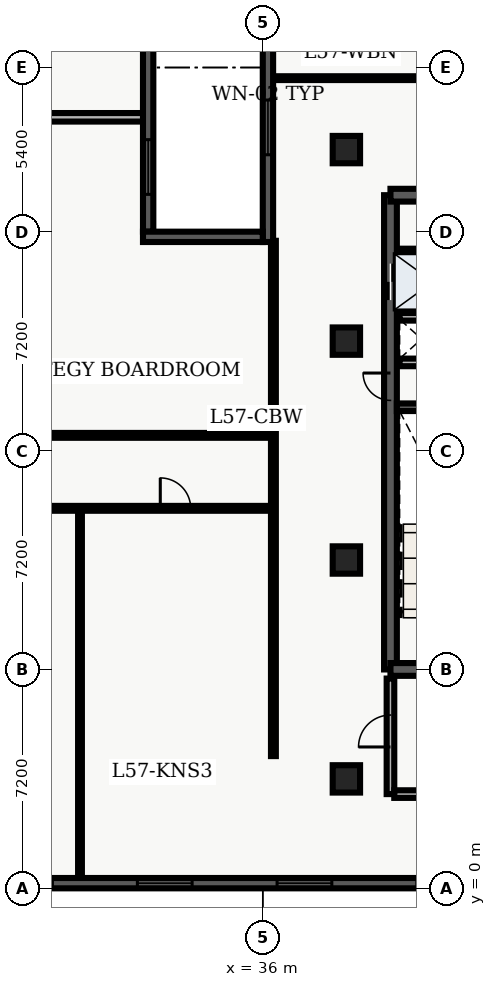
"""IFC4 building model, lengths in metres.
Left out: names, types, materials, properties, quantities, classifications, styles, units other than length and angle.
Written with IfcOpenShell. Run it as: python <this file> out.ifc"""

import sys

from ifc_helpers import new_model, entity, si_unit, converted_unit, direction, frame, origin_with_axes, origin_2d_with_axis, place, context, subcontext, project, spatial, polyline, rectangle, outline, extrude, element, fill, save


model = new_model("IFC4")
c1 = context("Model", 3, precision=1e-05, world=origin_with_axes(), true_north=direction((0.0, 1.0)))
c2 = subcontext(c1, "Body", "Model", "MODEL_VIEW")
j1 = project(units=[si_unit("LENGTHUNIT", "METRE"), converted_unit("PLANEANGLEUNIT", "DEGREE", entity("IfcPlaneAngleMeasure", 0.017), si_unit("PLANEANGLEUNIT", "RADIAN"), dimensions=[0, 0, 0, 0, 0, 0, 0])], contexts=[c1])
p1 = place(None, origin_with_axes())
s1 = spatial("IfcSite", under=j1, at=p1, CompositionType="ELEMENT")
p2 = place(p1, origin_with_axes())
s2 = spatial("IfcBuilding", under=s1, at=p2, CompositionType="ELEMENT")
p3 = place(p2, frame((0.0, 0.0, 232.5), z_axis=(0.0, 0.0, 1.0), x_axis=(1.0, 0.0, 0.0)))
s3 = spatial("IfcBuildingStorey", under=s2, at=p3, CompositionType="ELEMENT", Elevation=232.5)
p4 = place(p3, frame((40.2, 7.2, 0.0), z_axis=(0.0, 0.0, 1.0), x_axis=(0.0, 1.0, 0.0)))
e1 = element("IfcWall", 1, at=p4, inside=s3, PredefinedType="SHEAR", context=c2, shape_type="SweptSolid", body=[
    extrude(outline(polyline([(0.0, -0.21), (15.6, -0.21), (15.6, 0.21), (0.0, 0.21), (0.0, -0.21)])), origin_with_axes(), (0.0, 0.0, 1.0), 3.66),
])
p5 = place(p4, frame((12.75, 0.0, 0.0), z_axis=(0.0, 0.0, 1.0), x_axis=(1.0, 0.0, 0.0)))
e2 = element("IfcOpeningElement", 2, at=p5, cuts=e1, PredefinedType="OPENING", context=c2, shape_type="SweptSolid", body=[
    extrude(rectangle(XDim=1.2, YDim=0.44, at=origin_2d_with_axis()), origin_with_axes(), (0.0, 0.0, 1.0), 2.15),
])
p6 = place(p4, frame((9.3, 0.0, 0.0), z_axis=(0.0, 0.0, 1.0), x_axis=(1.0, 0.0, 0.0)))
e3 = element("IfcOpeningElement", 3, at=p6, cuts=e1, PredefinedType="OPENING", context=c2, shape_type="SweptSolid", body=[
    extrude(rectangle(XDim=0.9, YDim=0.44, at=origin_2d_with_axis()), origin_with_axes(), (0.0, 0.0, 1.0), 2.15),
])
p7 = place(p3, frame((40.2, 7.2, 0.0), z_axis=(0.0, 0.0, 1.0), x_axis=(1.0, 0.0, 0.0)))
e4 = element("IfcWall", 4, at=p7, inside=s3, PredefinedType="SHEAR", context=c2, shape_type="SweptSolid", body=[
    extrude(outline(polyline([(0.0, -0.21), (7.85, -0.21), (7.85, 0.21), (0.0, 0.21), (0.0, -0.21)])), origin_with_axes(), (0.0, 0.0, 1.0), 3.66),
])
p8 = place(p7, frame((2.175, 0.0, 0.0), z_axis=(0.0, 0.0, 1.0), x_axis=(1.0, 0.0, 0.0)))
e5 = element("IfcOpeningElement", 5, at=p8, cuts=e4, PredefinedType="OPENING", context=c2, shape_type="SweptSolid", body=[
    extrude(rectangle(XDim=1.05, YDim=0.44, at=origin_2d_with_axis()), origin_with_axes(), (0.0, 0.0, 1.0), 2.15),
])
p9 = place(p3, frame((40.2, 22.8, 0.0), z_axis=(0.0, 0.0, 1.0), x_axis=(1.0, 0.0, 0.0)))
e6 = element("IfcWall", 6, at=p9, inside=s3, PredefinedType="SHEAR", context=c2, shape_type="SweptSolid", body=[
    extrude(outline(polyline([(0.0, -0.21), (7.85, -0.21), (7.85, 0.21), (0.0, 0.21), (0.0, -0.21)])), origin_with_axes(), (0.0, 0.0, 1.0), 3.66),
])
p10 = place(p9, frame((5.775, 0.0, 0.0), z_axis=(0.0, 0.0, 1.0), x_axis=(1.0, 0.0, 0.0)))
e7 = element("IfcOpeningElement", 7, at=p10, cuts=e6, PredefinedType="OPENING", context=c2, shape_type="SweptSolid", body=[
    extrude(rectangle(XDim=1.05, YDim=0.44, at=origin_2d_with_axis()), origin_with_axes(), (0.0, 0.0, 1.0), 2.15),
])
p11 = place(p9, frame((2.15, 0.0, 0.0), z_axis=(0.0, 0.0, 1.0), x_axis=(1.0, 0.0, 0.0)))
e8 = element("IfcOpeningElement", 8, at=p11, cuts=e6, PredefinedType="OPENING", context=c2, shape_type="SweptSolid", body=[
    extrude(rectangle(XDim=0.9, YDim=0.44, at=origin_2d_with_axis()), origin_with_axes(), (0.0, 0.0, 1.0), 2.15),
])
p12 = place(p3, frame((40.41, 15.825, 0.0), z_axis=(0.0, 0.0, 1.0), x_axis=(1.0, 0.0, 0.0)))
e9 = element("IfcWall", 9, at=p12, inside=s3, PredefinedType="SHEAR", context=c2, shape_type="SweptSolid", body=[
    extrude(outline(polyline([(0.0, -0.125), (3.59, -0.125), (3.59, 0.125), (0.0, 0.125), (0.0, -0.125)])), origin_with_axes(), (0.0, 0.0, 1.0), 3.66),
])
p13 = place(p3, frame((40.5, 17.3, 0.0), z_axis=(0.0, 0.0, 1.0), x_axis=(1.0, 0.0, 0.0)))
e10 = element("IfcWall", 10, at=p13, inside=s3, PredefinedType="SOLIDWALL", context=c2, shape_type="SweptSolid", body=[
    extrude(outline(polyline([(0.0, -0.125), (3.5, -0.125), (3.5, 0.125), (0.0, 0.125), (0.0, -0.125)])), origin_with_axes(), (0.0, 0.0, 1.0), 2.7),
])
p14 = place(p13, frame((2.4, 0.0, 0.0), z_axis=(0.0, 0.0, 1.0), x_axis=(1.0, 0.0, 0.0)))
e11 = element("IfcOpeningElement", 11, at=p14, cuts=e10, PredefinedType="OPENING", context=c2, shape_type="SweptSolid", body=[
    extrude(rectangle(XDim=0.9, YDim=0.27, at=origin_2d_with_axis()), origin_with_axes(), (0.0, 0.0, 1.0), 2.15),
])
p15 = place(p3, frame((40.5, 18.8, 0.0), z_axis=(0.0, 0.0, 1.0), x_axis=(1.0, 0.0, 0.0)))
e12 = element("IfcWall", 12, at=p15, inside=s3, PredefinedType="SOLIDWALL", context=c2, shape_type="SweptSolid", body=[
    extrude(outline(polyline([(0.0, -0.125), (3.5, -0.125), (3.5, 0.125), (0.0, 0.125), (0.0, -0.125)])), origin_with_axes(), (0.0, 0.0, 1.0), 2.7),
])
p16 = place(p3, frame((40.2, 3.1, 0.0), z_axis=(0.0, 0.0, 1.0), x_axis=(0.0, 1.0, 0.0)))
e13 = element("IfcWall", 13, at=p16, inside=s3, PredefinedType="SOLIDWALL", context=c2, shape_type="SweptSolid", body=[
    extrude(outline(polyline([(0.0, -0.125), (3.8, -0.125), (3.8, 0.125), (0.0, 0.125), (0.0, -0.125)])), origin_with_axes(), (0.0, 0.0, 1.0), 2.7),
])
p17 = place(p16, frame((2.075, 0.0, 0.0), z_axis=(0.0, 0.0, 1.0), x_axis=(1.0, 0.0, 0.0)))
e14 = element("IfcOpeningElement", 14, at=p17, cuts=e13, PredefinedType="OPENING", context=c2, shape_type="SweptSolid", body=[
    extrude(rectangle(XDim=1.05, YDim=0.27, at=origin_2d_with_axis()), origin_with_axes(), (0.0, 0.0, 1.0), 2.15),
])
p18 = place(p3, frame((40.325, 3.1, 0.0), z_axis=(0.0, 0.0, 1.0), x_axis=(1.0, 0.0, 0.0)))
e15 = element("IfcWall", 15, at=p18, inside=s3, PredefinedType="SOLIDWALL", context=c2, shape_type="SweptSolid", body=[
    extrude(outline(polyline([(0.0, -0.125), (3.95, -0.125), (3.95, 0.125), (0.0, 0.125), (0.0, -0.125)])), origin_with_axes(), (0.0, 0.0, 1.0), 2.7),
])
for number, where, z_axis, x_axis in (
    (16, (38.75, 3.6, 0.0), (0.0, 0.0, 1.0), (1.0, 0.0, 0.0)),
    (17, (38.75, 10.8, 0.0), (0.0, 0.0, 1.0), (1.0, 0.0, 0.0)),
    (18, (38.75, 18.0, 0.0), (0.0, 0.0, 1.0), (1.0, 0.0, 0.0)),
    (19, (38.75, 24.3, 0.0), (0.0, 0.0, 1.0), (1.0, 0.0, 0.0)),
):
    element("IfcColumn", number, at=place(p3, frame(where, z_axis=z_axis, x_axis=x_axis)), inside=s3, PredefinedType="COLUMN", context=c2, shape_type="SweptSolid", body=[
        extrude(rectangle(XDim=0.9, YDim=0.9, at=origin_2d_with_axis()), origin_with_axes(), (0.0, 0.0, 1.0), 3.9),
    ])
p19 = place(p3, frame((40.5, 20.96, 0.0), z_axis=(0.0, 0.0, 1.0), x_axis=(1.0, 0.0, 0.0)))
e20 = element("IfcWall", 20, at=p19, inside=s3, PredefinedType="PARTITIONING", context=c2, shape_type="SweptSolid", body=[
    extrude(outline(polyline([(0.0, -0.08), (3.5, -0.08), (3.5, 0.08), (0.0, 0.08), (0.0, -0.08)])), origin_with_axes(), (0.0, 0.0, 1.0), 2.7),
])
p20 = place(p3, frame((20.45, 25.362, 0.0), z_axis=(0.0, 0.0, 1.0), x_axis=(1.0, 0.0, 0.0)))
e21 = element("IfcWall", 21, at=p20, inside=s3, PredefinedType="PARTITIONING", context=c2, shape_type="SweptSolid", body=[
    extrude(outline(polyline([(0.0, -0.14), (11.615, -0.14), (11.615, 0.14), (0.0, 0.14), (0.0, -0.14)])), origin_with_axes(), (0.0, 0.0, 1.0), 2.7),
])
p21 = place(p3, frame((20.3, 12.5, 0.0), z_axis=(0.0, 0.0, 1.0), x_axis=(1.0, 0.0, 0.0)))
e22 = element("IfcWall", 22, at=p21, inside=s3, PredefinedType="PARTITIONING", context=c2, shape_type="SweptSolid", body=[
    extrude(outline(polyline([(0.0, -0.08), (16.05, -0.08), (16.05, 0.08), (0.0, 0.08), (0.0, -0.08)])), origin_with_axes(), (0.0, 0.0, 1.0), 2.7),
])
p22 = place(p21, frame((2.383, 0.0, 0.0), z_axis=(0.0, 0.0, 1.0), x_axis=(1.0, 0.0, 0.0)))
e23 = element("IfcOpeningElement", 23, at=p22, cuts=e22, PredefinedType="OPENING", context=c2, shape_type="SweptSolid", body=[
    extrude(rectangle(XDim=1.2, YDim=0.18, at=origin_2d_with_axis()), origin_with_axes(), (0.0, 0.0, 1.0), 2.2),
])
p23 = place(p21, frame((7.137, 0.0, 0.0), z_axis=(0.0, 0.0, 1.0), x_axis=(1.0, 0.0, 0.0)))
e24 = element("IfcOpeningElement", 24, at=p23, cuts=e22, PredefinedType="OPENING", context=c2, shape_type="SweptSolid", body=[
    extrude(rectangle(XDim=1.0, YDim=0.18, at=origin_2d_with_axis()), origin_with_axes(), (0.0, 0.0, 1.0), 2.15),
])
p24 = place(p21, frame((12.829, 0.0, 0.0), z_axis=(0.0, 0.0, 1.0), x_axis=(1.0, 0.0, 0.0)))
e25 = element("IfcOpeningElement", 25, at=p24, cuts=e22, PredefinedType="OPENING", context=c2, shape_type="SweptSolid", body=[
    extrude(rectangle(XDim=1.0, YDim=0.18, at=origin_2d_with_axis()), origin_with_axes(), (0.0, 0.0, 1.0), 2.15),
])
p25 = place(p3, frame((20.3, 14.9, 0.0), z_axis=(0.0, 0.0, 1.0), x_axis=(1.0, 0.0, 0.0)))
e26 = element("IfcWall", 26, at=p25, inside=s3, PredefinedType="PARTITIONING", context=c2, shape_type="SweptSolid", body=[
    extrude(outline(polyline([(0.0, -0.08), (16.05, -0.08), (16.05, 0.08), (0.0, 0.08), (0.0, -0.08)])), origin_with_axes(), (0.0, 0.0, 1.0), 2.7),
])
p26 = place(p25, frame((8.075, 0.0, 0.0), z_axis=(0.0, 0.0, 1.0), x_axis=(1.0, 0.0, 0.0)))
e27 = element("IfcOpeningElement", 27, at=p26, cuts=e26, PredefinedType="OPENING", context=c2, shape_type="SweptSolid", body=[
    extrude(rectangle(XDim=1.2, YDim=0.18, at=origin_2d_with_axis()), origin_with_axes(), (0.0, 0.0, 1.0), 2.2),
])
p27 = place(p3, frame((36.35, 4.35, 0.0), z_axis=(0.0, 0.0, 1.0), x_axis=(0.0, 1.0, 0.0)))
e28 = element("IfcWall", 28, at=p27, inside=s3, PredefinedType="PARTITIONING", context=c2, shape_type="SweptSolid", body=[
    extrude(outline(polyline([(0.0, -0.08), (16.95, -0.08), (16.95, 0.08), (0.0, 0.08), (0.0, -0.08)])), origin_with_axes(), (0.0, 0.0, 1.0), 2.7),
])
p28 = place(p3, frame((29.988, 0.335, 0.0), z_axis=(0.0, 0.0, 1.0), x_axis=(0.0, 1.0, 0.0)))
e29 = element("IfcWall", 29, at=p28, inside=s3, PredefinedType="PARTITIONING", context=c2, shape_type="SweptSolid", body=[
    extrude(outline(polyline([(0.0, -0.062), (12.045, -0.062), (12.045, 0.062), (0.0, 0.062), (0.0, -0.062)])), origin_with_axes(), (0.0, 0.0, 1.0), 2.7),
])
p29 = place(p3, frame((36.335, 26.65, 0.0), z_axis=(0.0, 0.0, 1.0), x_axis=(1.0, 0.0, 0.0)))
e30 = element("IfcWall", 30, at=p29, inside=s3, PredefinedType="PARTITIONING", context=c2, shape_type="SweptSolid", body=[
    extrude(outline(polyline([(0.0, -0.062), (11.195, -0.062), (11.195, 0.062), (0.0, 0.062), (0.0, -0.062)])), origin_with_axes(), (0.0, 0.0, 1.0), 2.7),
])
p30 = place(p29, frame((6.665, 0.0, 0.0), z_axis=(0.0, 0.0, 1.0), x_axis=(1.0, 0.0, 0.0)))
e31 = element("IfcOpeningElement", 31, at=p30, cuts=e30, PredefinedType="OPENING", context=c2, shape_type="SweptSolid", body=[
    extrude(rectangle(XDim=1.0, YDim=0.145, at=origin_2d_with_axis()), origin_with_axes(), (0.0, 0.0, 1.0), 2.15),
])
p31 = place(p3, frame((36.17, 21.26, 0.0), z_axis=(0.0, 0.0, 1.0), x_axis=(0.0, 1.0, 0.0)))
e32 = element("IfcWall", 32, at=p31, inside=s3, PredefinedType="SOLIDWALL", context=c2, shape_type="SweptSolid", body=[
    extrude(outline(polyline([(0.0, -0.17), (7.54, -0.17), (7.54, 0.17), (0.0, 0.17), (0.0, -0.17)])), origin_with_axes(), (0.0, 0.0, 1.0), 3.66),
])
p32 = place(p31, frame((3.77, 0.0, 0.45), z_axis=(0.0, 0.0, 1.0), x_axis=(1.0, 0.0, 0.0)))
e33 = element("IfcOpeningElement", 33, at=p32, cuts=e32, PredefinedType="OPENING", context=c2, shape_type="SweptSolid", body=[
    extrude(rectangle(XDim=1.8, YDim=0.36, at=origin_2d_with_axis()), origin_with_axes(), (0.0, 0.0, 1.0), 2.1),
])
p33 = place(p3, frame((49.46, 0.17, 0.0), z_axis=(0.0, 0.0, 1.0), x_axis=(-1.0, 0.0, 0.0)))
e34 = element("IfcWall", 34, at=p33, inside=s3, PredefinedType="SOLIDWALL", context=c2, shape_type="SweptSolid", body=[
    extrude(outline(polyline([(0.0, -0.17), (42.56, -0.17), (42.56, 0.17), (0.0, 0.17), (0.0, -0.17)])), origin_with_axes(), (0.0, 0.0, 1.0), 3.66),
])
p34 = place(p33, frame((2.898, 0.0, 0.45), z_axis=(0.0, 0.0, 1.0), x_axis=(1.0, 0.0, 0.0)))
e35 = element("IfcOpeningElement", 35, at=p34, cuts=e34, PredefinedType="OPENING", context=c2, shape_type="SweptSolid", body=[
    extrude(rectangle(XDim=1.8, YDim=0.36, at=origin_2d_with_axis()), origin_with_axes(), (0.0, 0.0, 1.0), 2.1),
])
p35 = place(p33, frame((7.493, 0.0, 0.45), z_axis=(0.0, 0.0, 1.0), x_axis=(1.0, 0.0, 0.0)))
e36 = element("IfcOpeningElement", 36, at=p35, cuts=e34, PredefinedType="OPENING", context=c2, shape_type="SweptSolid", body=[
    extrude(rectangle(XDim=1.8, YDim=0.36, at=origin_2d_with_axis()), origin_with_axes(), (0.0, 0.0, 1.0), 2.1),
])
p36 = place(p33, frame((12.089, 0.0, 0.45), z_axis=(0.0, 0.0, 1.0), x_axis=(1.0, 0.0, 0.0)))
e37 = element("IfcOpeningElement", 37, at=p36, cuts=e34, PredefinedType="OPENING", context=c2, shape_type="SweptSolid", body=[
    extrude(rectangle(XDim=1.8, YDim=0.36, at=origin_2d_with_axis()), origin_with_axes(), (0.0, 0.0, 1.0), 2.1),
])
p37 = place(p33, frame((16.684, 0.0, 0.45), z_axis=(0.0, 0.0, 1.0), x_axis=(1.0, 0.0, 0.0)))
e38 = element("IfcOpeningElement", 38, at=p37, cuts=e34, PredefinedType="OPENING", context=c2, shape_type="SweptSolid", body=[
    extrude(rectangle(XDim=1.8, YDim=0.36, at=origin_2d_with_axis()), origin_with_axes(), (0.0, 0.0, 1.0), 2.1),
])
p38 = place(p33, frame((21.28, 0.0, 0.45), z_axis=(0.0, 0.0, 1.0), x_axis=(1.0, 0.0, 0.0)))
e39 = element("IfcOpeningElement", 39, at=p38, cuts=e34, PredefinedType="OPENING", context=c2, shape_type="SweptSolid", body=[
    extrude(rectangle(XDim=1.8, YDim=0.36, at=origin_2d_with_axis()), origin_with_axes(), (0.0, 0.0, 1.0), 2.1),
])
p39 = place(p33, frame((26.326, 0.0, 0.45), z_axis=(0.0, 0.0, 1.0), x_axis=(1.0, 0.0, 0.0)))
e40 = element("IfcOpeningElement", 40, at=p39, cuts=e34, PredefinedType="OPENING", context=c2, shape_type="SweptSolid", body=[
    extrude(rectangle(XDim=1.8, YDim=0.36, at=origin_2d_with_axis()), origin_with_axes(), (0.0, 0.0, 1.0), 2.1),
])
p40 = place(p33, frame((30.471, 0.0, 0.45), z_axis=(0.0, 0.0, 1.0), x_axis=(1.0, 0.0, 0.0)))
e41 = element("IfcOpeningElement", 41, at=p40, cuts=e34, PredefinedType="OPENING", context=c2, shape_type="SweptSolid", body=[
    extrude(rectangle(XDim=1.8, YDim=0.36, at=origin_2d_with_axis()), origin_with_axes(), (0.0, 0.0, 1.0), 2.1),
])
p41 = place(p33, frame((35.917, 0.0, 0.45), z_axis=(0.0, 0.0, 1.0), x_axis=(1.0, 0.0, 0.0)))
e42 = element("IfcOpeningElement", 42, at=p41, cuts=e34, PredefinedType="OPENING", context=c2, shape_type="SweptSolid", body=[
    extrude(rectangle(XDim=1.8, YDim=0.36, at=origin_2d_with_axis()), origin_with_axes(), (0.0, 0.0, 1.0), 2.1),
])
p42 = place(p33, frame((40.112, 0.0, 0.45), z_axis=(0.0, 0.0, 1.0), x_axis=(1.0, 0.0, 0.0)))
e43 = element("IfcOpeningElement", 43, at=p42, cuts=e34, PredefinedType="OPENING", context=c2, shape_type="SweptSolid", body=[
    extrude(rectangle(XDim=1.8, YDim=0.36, at=origin_2d_with_axis()), origin_with_axes(), (0.0, 0.0, 1.0), 2.1),
])
p43 = place(p3, frame((32.23, 41.82, 0.0), z_axis=(0.0, 0.0, 1.0), x_axis=(0.0, -1.0, 0.0)))
e44 = element("IfcWall", 44, at=p43, inside=s3, PredefinedType="SOLIDWALL", context=c2, shape_type="SweptSolid", body=[
    extrude(outline(polyline([(0.0, -0.17), (20.22, -0.17), (20.22, 0.17), (0.0, 0.17), (0.0, -0.17)])), origin_with_axes(), (0.0, 0.0, 1.0), 3.66),
])
p44 = place(p43, frame((2.978, 0.0, 0.45), z_axis=(0.0, 0.0, 1.0), x_axis=(1.0, 0.0, 0.0)))
e45 = element("IfcOpeningElement", 45, at=p44, cuts=e44, PredefinedType="OPENING", context=c2, shape_type="SweptSolid", body=[
    extrude(rectangle(XDim=1.8, YDim=0.36, at=origin_2d_with_axis()), origin_with_axes(), (0.0, 0.0, 1.0), 2.1),
])
p45 = place(p43, frame((18.093, 0.0, 0.45), z_axis=(0.0, 0.0, 1.0), x_axis=(1.0, 0.0, 0.0)))
e46 = element("IfcOpeningElement", 46, at=p45, cuts=e44, PredefinedType="OPENING", context=c2, shape_type="SweptSolid", body=[
    extrude(rectangle(XDim=1.8, YDim=0.36, at=origin_2d_with_axis()), origin_with_axes(), (0.0, 0.0, 1.0), 2.1),
])
p46 = place(p3, frame((32.06, 21.43, 0.0), z_axis=(0.0, 0.0, 1.0), x_axis=(1.0, 0.0, 0.0)))
e47 = element("IfcWall", 47, at=p46, inside=s3, PredefinedType="SOLIDWALL", context=c2, shape_type="SweptSolid", body=[
    extrude(outline(polyline([(0.0, -0.17), (3.94, -0.17), (3.94, 0.17), (0.0, 0.17), (0.0, -0.17)])), origin_with_axes(), (0.0, 0.0, 1.0), 3.66),
])
p47 = place(p4, frame((12.75, 0.0, 0.0), z_axis=(0.0, 0.0, 1.0), x_axis=(1.0, 0.0, 0.0)))
e48 = element("IfcDoor", 48, at=p47, inside=s3, OperationType="DOUBLE_DOOR_SLIDING", PredefinedType="DOOR", context=c2, shape_type="SweptSolid", body=[
    extrude(rectangle(XDim=1.2, YDim=0.09, at=origin_2d_with_axis()), origin_with_axes(), (0.0, 0.0, 1.0), 2.15),
])
fill(e2, e48)
p48 = place(p4, frame((9.3, 0.0, 0.0), z_axis=(0.0, 0.0, 1.0), x_axis=(1.0, 0.0, 0.0)))
e49 = element("IfcDoor", 49, at=p48, inside=s3, OperationType="SINGLE_SWING_RIGHT", PredefinedType="DOOR", context=c2, shape_type="SweptSolid", body=[
    extrude(rectangle(XDim=0.9, YDim=0.09, at=origin_2d_with_axis()), origin_with_axes(), (0.0, 0.0, 1.0), 2.15),
])
fill(e3, e49)
p49 = place(p16, frame((2.075, 0.0, 0.0), z_axis=(0.0, 0.0, 1.0), x_axis=(1.0, 0.0, 0.0)))
e50 = element("IfcDoor", 50, at=p49, inside=s3, OperationType="SINGLE_SWING_LEFT", PredefinedType="DOOR", context=c2, shape_type="SweptSolid", body=[
    extrude(rectangle(XDim=1.05, YDim=0.09, at=origin_2d_with_axis()), origin_with_axes(), (0.0, 0.0, 1.0), 2.15),
])
fill(e14, e50)
p50 = place(p21, frame((12.829, 0.0, 0.0), z_axis=(0.0, 0.0, 1.0), x_axis=(1.0, 0.0, 0.0)))
e51 = element("IfcDoor", 51, at=p50, inside=s3, OperationType="SINGLE_SWING_LEFT", PredefinedType="DOOR", context=c2, shape_type="SweptSolid", body=[
    extrude(rectangle(XDim=1.0, YDim=0.09, at=origin_2d_with_axis()), origin_with_axes(), (0.0, 0.0, 1.0), 2.15),
])
fill(e25, e51)
p51 = place(p31, frame((3.77, 0.0, 0.45), z_axis=(0.0, 0.0, 1.0), x_axis=(1.0, 0.0, 0.0)))
e52 = element("IfcWindow", 52, at=p51, inside=s3, PredefinedType="WINDOW", context=c2, shape_type="SweptSolid", body=[
    extrude(rectangle(XDim=1.8, YDim=0.09, at=origin_2d_with_axis()), origin_with_axes(), (0.0, 0.0, 1.0), 2.1),
])
fill(e33, e52)
p52 = place(p33, frame((12.089, 0.0, 0.45), z_axis=(0.0, 0.0, 1.0), x_axis=(1.0, 0.0, 0.0)))
e53 = element("IfcWindow", 53, at=p52, inside=s3, PredefinedType="WINDOW", context=c2, shape_type="SweptSolid", body=[
    extrude(rectangle(XDim=1.8, YDim=0.09, at=origin_2d_with_axis()), origin_with_axes(), (0.0, 0.0, 1.0), 2.1),
])
fill(e37, e53)
p53 = place(p33, frame((16.684, 0.0, 0.45), z_axis=(0.0, 0.0, 1.0), x_axis=(1.0, 0.0, 0.0)))
e54 = element("IfcWindow", 54, at=p53, inside=s3, PredefinedType="WINDOW", context=c2, shape_type="SweptSolid", body=[
    extrude(rectangle(XDim=1.8, YDim=0.09, at=origin_2d_with_axis()), origin_with_axes(), (0.0, 0.0, 1.0), 2.1),
])
fill(e38, e54)
p54 = place(p33, frame((21.28, 0.0, 0.45), z_axis=(0.0, 0.0, 1.0), x_axis=(1.0, 0.0, 0.0)))
e55 = element("IfcWindow", 55, at=p54, inside=s3, PredefinedType="WINDOW", context=c2, shape_type="SweptSolid", body=[
    extrude(rectangle(XDim=1.8, YDim=0.09, at=origin_2d_with_axis()), origin_with_axes(), (0.0, 0.0, 1.0), 2.1),
])
fill(e39, e55)
p55 = place(p43, frame((18.093, 0.0, 0.45), z_axis=(0.0, 0.0, 1.0), x_axis=(1.0, 0.0, 0.0)))
e56 = element("IfcWindow", 56, at=p55, inside=s3, PredefinedType="WINDOW", context=c2, shape_type="SweptSolid", body=[
    extrude(rectangle(XDim=1.8, YDim=0.09, at=origin_2d_with_axis()), origin_with_axes(), (0.0, 0.0, 1.0), 2.1),
])
fill(e46, e56)
save(model, sys.argv[1])
